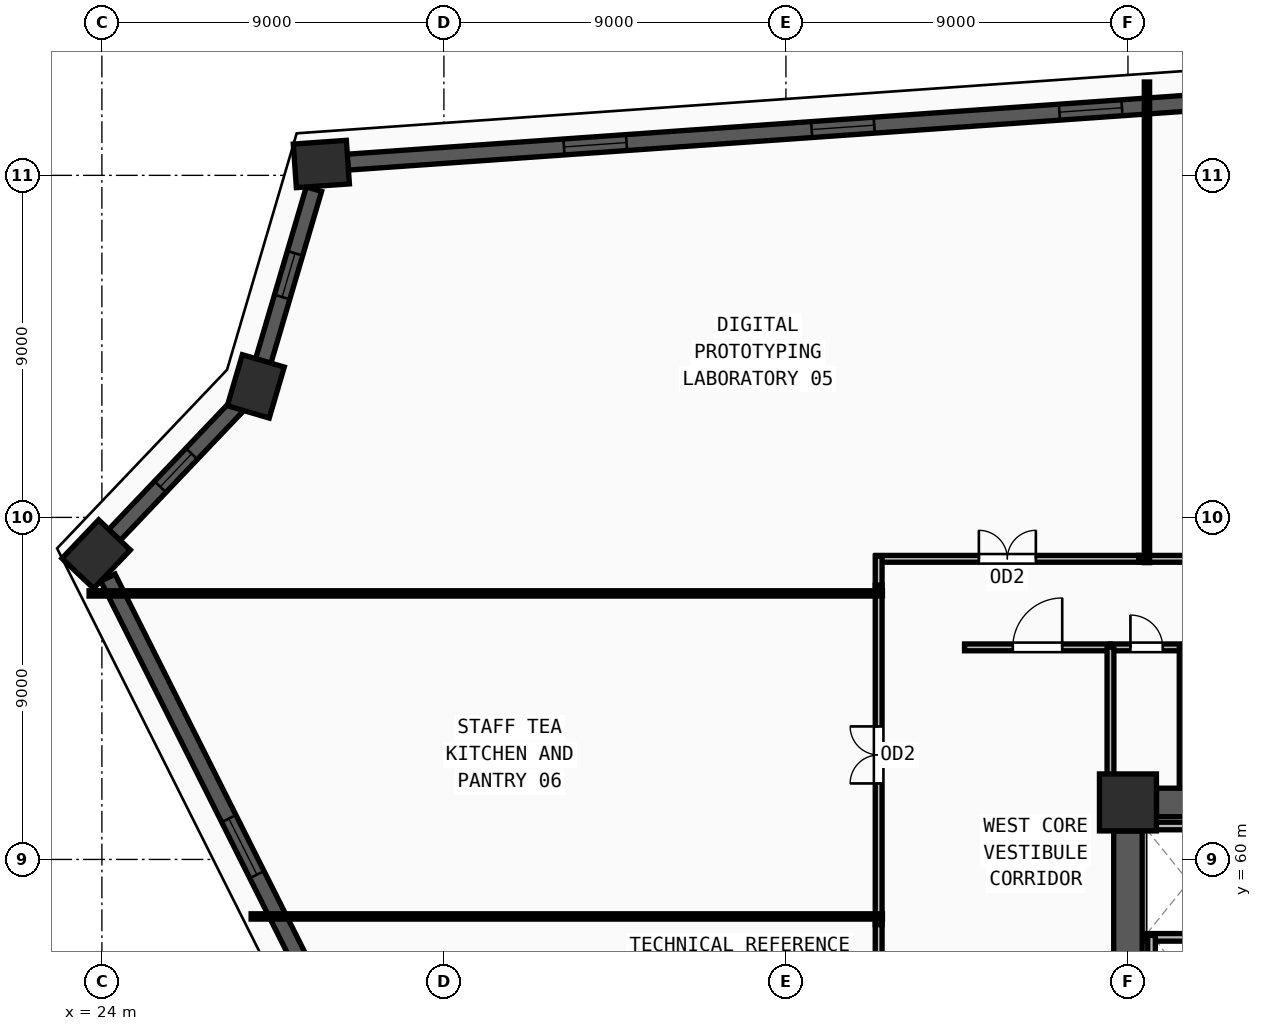
"""IFC4 building model, lengths in metres.
Left out: names, types, materials, properties, quantities, classifications, styles, units other than length and angle.
Written with IfcOpenShell. Run it as: python <this file> out.ifc"""

import sys

from ifc_helpers import new_model, si_unit, direction, frame, frame_2d, origin, origin_2d, place, context, subcontext, project, spatial, rectangle, extrude, source, transform, mapped, element, fill, save


model = new_model("IFC4")
c1 = context("Model", 3, precision=1e-05, world=origin(), true_north=direction((0.0, 1.0)))
c2 = subcontext(c1, "Body", "Model", "MODEL_VIEW")
j1 = project(units=[si_unit("LENGTHUNIT", "METRE"), si_unit("PLANEANGLEUNIT", "RADIAN")], contexts=[c1])
p1 = place(None, origin())
s1 = spatial("IfcSite", under=j1, at=p1, CompositionType="ELEMENT")
p2 = place(p1, origin())
s2 = spatial("IfcBuilding", under=s1, at=p2, CompositionType="ELEMENT")
p3 = place(p2, frame((0.0, 0.0, 124.5)))
s3 = spatial("IfcBuildingStorey", under=s2, at=p3, CompositionType="ELEMENT", Elevation=124.5)
m1 = source(origin(), c2, "Body", "SweptSolid", [
    extrude(rectangle(XDim=1.5, YDim=1.5, at=origin_2d()), origin(), (0.0, 0.0, 1.0), 3.75),
])
p4 = place(p3, frame((51.0, 61.5, 0.0), z_axis=(0.0, 0.0, 1.0), x_axis=(1.0, 0.0, 0.0)))
e1 = element("IfcColumn", 1, at=p4, inside=s3, PredefinedType="COLUMN", context=c2, shape_type="MappedRepresentation", body=[
    mapped(m1, transform((0.0, 0.0, 0.0), x_axis=(1.0, 0.0, 0.0), y_axis=(0.0, 1.0, 0.0), z_axis=(0.0, 0.0, 1.0), scale=1.0)),
])
m2 = source(origin(), c2, "Body", "SweptSolid", [
    extrude(rectangle(XDim=1.4, YDim=1.15, at=origin_2d()), origin(), (0.0, 0.0, 1.0), 3.75),
])
for number, where, z_axis, x_axis in (
    (2, (23.849, 68.032, 0.0), (0.0, 0.0, 1.0), (0.689, 0.724, 0.0)),
    (3, (28.05, 72.447, 0.0), (0.0, 0.0, 1.0), (0.283, 0.959, 0.0)),
    (4, (29.775, 78.299, 0.0), (0.0, 0.0, 1.0), (0.998, 0.07, 0.0)),
):
    element("IfcColumn", number, at=place(p3, frame(where, z_axis=z_axis, x_axis=x_axis)), inside=s3, PredefinedType="COLUMN", context=c2, shape_type="MappedRepresentation", body=[
        mapped(m2, transform((0.0, 0.0, 0.0), x_axis=(1.0, 0.0, 0.0), y_axis=(0.0, 1.0, 0.0), z_axis=(0.0, 0.0, 1.0), scale=1.0)),
    ])
p5 = place(p3, frame((56.538, 80.178, 0.0), z_axis=(0.0, 0.0, 1.0), x_axis=(-0.997543510354, -0.070049589226, 0.0)))
e5 = element("IfcWall", 5, at=p5, inside=s3, PredefinedType="SOLIDWALL", context=c2, shape_type="SweptSolid", body=[
    extrude(rectangle(XDim=26.139, YDim=0.42, at=frame_2d((13.07, 0.0))), origin(), (0.0, 0.0, 1.0), 3.57),
])
m3 = source(origin(), c2, "Body", "SweptSolid", [
    extrude(rectangle(XDim=1.65, YDim=1.95, at=frame_2d((0.825, 0.975))), frame((0.0, 0.22, 0.0), z_axis=(0.0, -1.0, 0.0), x_axis=(1.0, 0.0, 0.0)), (0.0, 0.0, 1.0), 0.44),
])
p6 = place(p5, frame((5.71, 0.0, 0.55)))
e6 = element("IfcOpeningElement", 6, at=p6, cuts=e5, PredefinedType="OPENING", context=c2, shape_type="MappedRepresentation", body=[
    mapped(m3, transform((0.0, 0.0, 0.0), x_axis=(1.0, 0.0, 0.0), y_axis=(0.0, 1.0, 0.0), z_axis=(0.0, 0.0, 1.0), scale=1.0)),
])
p7 = place(p5, frame((12.245, 0.0, 0.55)))
e7 = element("IfcOpeningElement", 7, at=p7, cuts=e5, PredefinedType="OPENING", context=c2, shape_type="MappedRepresentation", body=[
    mapped(m3, transform((0.0, 0.0, 0.0), x_axis=(1.0, 0.0, 0.0), y_axis=(0.0, 1.0, 0.0), z_axis=(0.0, 0.0, 1.0), scale=1.0)),
])
p8 = place(p5, frame((18.779, 0.0, 0.55)))
e8 = element("IfcOpeningElement", 8, at=p8, cuts=e5, PredefinedType="OPENING", context=c2, shape_type="MappedRepresentation", body=[
    mapped(m3, transform((0.0, 0.0, 0.0), x_axis=(1.0, 0.0, 0.0), y_axis=(0.0, 1.0, 0.0), z_axis=(0.0, 0.0, 1.0), scale=1.0)),
])
p9 = place(p3, frame((29.58, 77.637, 0.0), z_axis=(0.0, 0.0, 1.0), x_axis=(-0.282785049885, -0.959183306549, 0.0)))
e9 = element("IfcWall", 9, at=p9, inside=s3, PredefinedType="SOLIDWALL", context=c2, shape_type="SweptSolid", body=[
    extrude(rectangle(XDim=4.721, YDim=0.42, at=frame_2d((2.36, 0.0))), origin(), (0.0, 0.0, 1.0), 3.57),
])
m4 = source(origin(), c2, "Body", "SweptSolid", [
    extrude(rectangle(XDim=1.2, YDim=1.9, at=frame_2d((0.6, 0.95))), frame((0.0, 0.22, 0.0), z_axis=(0.0, -1.0, 0.0), x_axis=(1.0, 0.0, 0.0)), (0.0, 0.0, 1.0), 0.44),
])
p10 = place(p9, frame((1.76, 0.0, 0.55)))
e10 = element("IfcOpeningElement", 10, at=p10, cuts=e9, PredefinedType="OPENING", context=c2, shape_type="MappedRepresentation", body=[
    mapped(m4, transform((0.0, 0.0, 0.0), x_axis=(1.0, 0.0, 0.0), y_axis=(0.0, 1.0, 0.0), z_axis=(0.0, 0.0, 1.0), scale=1.0)),
])
p11 = place(p3, frame((27.574, 71.947, 0.0), z_axis=(0.0, 0.0, 1.0), x_axis=(-0.689277430431, -0.72449749751, 0.0)))
e11 = element("IfcWall", 11, at=p11, inside=s3, PredefinedType="SOLIDWALL", context=c2, shape_type="SweptSolid", body=[
    extrude(rectangle(XDim=4.714, YDim=0.42, at=frame_2d((2.357, 0.0))), origin(), (0.0, 0.0, 1.0), 3.57),
])
p12 = place(p11, frame((1.757, 0.0, 0.55)))
e12 = element("IfcOpeningElement", 12, at=p12, cuts=e11, PredefinedType="OPENING", context=c2, shape_type="MappedRepresentation", body=[
    mapped(m4, transform((0.0, 0.0, 0.0), x_axis=(1.0, 0.0, 0.0), y_axis=(0.0, 1.0, 0.0), z_axis=(0.0, 0.0, 1.0), scale=1.0)),
])
p13 = place(p3, frame((24.158, 67.415, 0.0), z_axis=(0.0, 0.0, 1.0), x_axis=(0.448489429893, -0.893788135564, 0.0)))
e13 = element("IfcWall", 13, at=p13, inside=s3, PredefinedType="SOLIDWALL", context=c2, shape_type="SweptSolid", body=[
    extrude(rectangle(XDim=31.677, YDim=0.42, at=frame_2d((15.839, 0.0))), origin(), (0.0, 0.0, 1.0), 3.57),
])
p14 = place(p13, frame((7.094, 0.0, 0.55)))
e14 = element("IfcOpeningElement", 14, at=p14, cuts=e13, PredefinedType="OPENING", context=c2, shape_type="MappedRepresentation", body=[
    mapped(m3, transform((0.0, 0.0, 0.0), x_axis=(1.0, 0.0, 0.0), y_axis=(0.0, 1.0, 0.0), z_axis=(0.0, 0.0, 1.0), scale=1.0)),
])
p15 = place(p13, frame((16.564, 0.0, 0.55)))
e15 = element("IfcOpeningElement", 15, at=p15, cuts=e13, PredefinedType="OPENING", context=c2, shape_type="MappedRepresentation", body=[
    mapped(m3, transform((0.0, 0.0, 0.0), x_axis=(1.0, 0.0, 0.0), y_axis=(0.0, 1.0, 0.0), z_axis=(0.0, 0.0, 1.0), scale=1.0)),
])
p16 = place(p13, frame((21.383, 0.0, 0.55)))
e16 = element("IfcOpeningElement", 16, at=p16, cuts=e13, PredefinedType="OPENING", context=c2, shape_type="MappedRepresentation", body=[
    mapped(m3, transform((0.0, 0.0, 0.0), x_axis=(1.0, 0.0, 0.0), y_axis=(0.0, 1.0, 0.0), z_axis=(0.0, 0.0, 1.0), scale=1.0)),
])
p17 = place(p3, frame((51.75, 61.5, 0.0), z_axis=(0.0, 0.0, 1.0), x_axis=(1.0, 0.0, 0.0)))
e17 = element("IfcWall", 17, at=p17, inside=s3, PredefinedType="SHEAR", context=c2, shape_type="SweptSolid", body=[
    extrude(rectangle(XDim=7.5, YDim=0.75, at=frame_2d((3.75, 0.0))), origin(), (0.0, 0.0, 1.0), 3.57),
])
p18 = place(p3, frame((51.0, 47.25, 0.0), z_axis=(0.0, 0.0, 1.0), x_axis=(0.0, 1.0, 0.0)))
e18 = element("IfcWall", 18, at=p18, inside=s3, PredefinedType="SHEAR", context=c2, shape_type="SweptSolid", body=[
    extrude(rectangle(XDim=13.5, YDim=0.75, at=frame_2d((6.75, 0.0))), origin(), (0.0, 0.0, 1.0), 3.57),
])
for number, where, z_axis, x_axis in (
    (19, (51.4, 57.95, 0.0), (0.0, 0.0, 1.0), (1.0, 0.0, 0.0)),
    (20, (53.8, 60.88, 0.0), (0.0, 0.0, 1.0), (-1.0, 0.0, 0.0)),
):
    element("IfcWall", number, at=place(p3, frame(where, z_axis=z_axis, x_axis=x_axis)), inside=s3, PredefinedType="SOLIDWALL", context=c2, shape_type="SweptSolid", body=[
        extrude(rectangle(XDim=2.4, YDim=0.2, at=frame_2d((1.2, 0.0))), origin(), (0.0, 0.0, 1.0), 3.57),
    ])
p19 = place(p3, frame((51.62, 58.0, 0.0), z_axis=(0.0, 0.0, 1.0), x_axis=(0.0, -1.0, 0.0)))
e21 = element("IfcWall", 21, at=p19, inside=s3, PredefinedType="SOLIDWALL", context=c2, shape_type="SweptSolid", body=[
    extrude(rectangle(XDim=3.0, YDim=0.2, at=frame_2d((1.5, 0.0))), origin(), (0.0, 0.0, 1.0), 3.57),
])
p20 = place(p3, frame((50.54, 65.58, 0.0), z_axis=(0.0, 0.0, 1.0), x_axis=(1.0, 0.0, 0.0)))
e22 = element("IfcWall", 22, at=p20, inside=s3, PredefinedType="PARTITIONING", context=c2, shape_type="SweptSolid", body=[
    extrude(rectangle(XDim=1.9, YDim=0.18, at=frame_2d((0.95, 0.0))), origin(), (0.0, 0.0, 1.0), 3.57),
])
m5 = source(origin(), c2, "Body", "SweptSolid", [
    extrude(rectangle(XDim=0.85, YDim=2.1, at=frame_2d((0.425, 1.05))), frame((0.0, 0.1, 0.0), z_axis=(0.0, -1.0, 0.0), x_axis=(1.0, 0.0, 0.0)), (0.0, 0.0, 1.0), 0.2),
])
p21 = place(p20, frame((0.525, 0.0, 0.0)))
e23 = element("IfcOpeningElement", 23, at=p21, cuts=e22, PredefinedType="OPENING", context=c2, shape_type="MappedRepresentation", body=[
    mapped(m5, transform((0.0, 0.0, 0.0), x_axis=(1.0, 0.0, 0.0), y_axis=(0.0, 1.0, 0.0), z_axis=(0.0, 0.0, 1.0), scale=1.0)),
])
p22 = place(p3, frame((46.7, 65.58, 0.0), z_axis=(0.0, 0.0, 1.0), x_axis=(1.0, 0.0, 0.0)))
e24 = element("IfcWall", 24, at=p22, inside=s3, PredefinedType="PARTITIONING", context=c2, shape_type="SweptSolid", body=[
    extrude(rectangle(XDim=3.84, YDim=0.18, at=frame_2d((1.92, 0.0))), origin(), (0.0, 0.0, 1.0), 3.57),
])
m6 = source(origin(), c2, "Body", "SweptSolid", [
    extrude(rectangle(XDim=1.3, YDim=2.2, at=frame_2d((0.65, 1.1))), frame((0.0, 0.1, 0.0), z_axis=(0.0, -1.0, 0.0), x_axis=(1.0, 0.0, 0.0)), (0.0, 0.0, 1.0), 0.2),
])
p23 = place(p22, frame((1.27, 0.0, 0.0)))
e25 = element("IfcOpeningElement", 25, at=p23, cuts=e24, PredefinedType="OPENING", context=c2, shape_type="MappedRepresentation", body=[
    mapped(m6, transform((0.0, 0.0, 0.0), x_axis=(1.0, 0.0, 0.0), y_axis=(0.0, 1.0, 0.0), z_axis=(0.0, 0.0, 1.0), scale=1.0)),
])
p24 = place(p3, frame((51.285, 67.91, 0.0), z_axis=(0.0, 0.0, 1.0), x_axis=(1.0, 0.0, 0.0)))
e26 = element("IfcWall", 26, at=p24, inside=s3, PredefinedType="PARTITIONING", context=c2, shape_type="SweptSolid", body=[
    extrude(rectangle(XDim=9.0, YDim=0.18, at=frame_2d((4.5, 0.0))), origin(), (0.0, 0.0, 1.0), 3.57),
])
m7 = source(origin(), c2, "Body", "SweptSolid", [
    extrude(rectangle(XDim=1.0, YDim=2.2, at=frame_2d((0.5, 1.1))), frame((0.0, 0.1, 0.0), z_axis=(0.0, -1.0, 0.0), x_axis=(1.0, 0.0, 0.0)), (0.0, 0.0, 1.0), 0.2),
])
p25 = place(p24, frame((4.0, 0.0, 0.0)))
e27 = element("IfcOpeningElement", 27, at=p25, cuts=e26, PredefinedType="OPENING", context=c2, shape_type="MappedRepresentation", body=[
    mapped(m7, transform((0.0, 0.0, 0.0), x_axis=(1.0, 0.0, 0.0), y_axis=(0.0, 1.0, 0.0), z_axis=(0.0, 0.0, 1.0), scale=1.0)),
])
p26 = place(p3, frame((44.37, 67.91, 0.0), z_axis=(0.0, 0.0, 1.0), x_axis=(1.0, 0.0, 0.0)))
e28 = element("IfcWall", 28, at=p26, inside=s3, PredefinedType="PARTITIONING", context=c2, shape_type="SweptSolid", body=[
    extrude(rectangle(XDim=6.915, YDim=0.18, at=frame_2d((3.458, 0.0))), origin(), (0.0, 0.0, 1.0), 3.57),
])
m8 = source(origin(), c2, "Body", "SweptSolid", [
    extrude(rectangle(XDim=1.5, YDim=2.2, at=frame_2d((0.75, 1.1))), frame((0.0, 0.1, 0.0), z_axis=(0.0, -1.0, 0.0), x_axis=(1.0, 0.0, 0.0)), (0.0, 0.0, 1.0), 0.2),
])
p27 = place(p26, frame((2.707, 0.0, 0.0)))
e29 = element("IfcOpeningElement", 29, at=p27, cuts=e28, PredefinedType="OPENING", context=c2, shape_type="MappedRepresentation", body=[
    mapped(m8, transform((0.0, 0.0, 0.0), x_axis=(1.0, 0.0, 0.0), y_axis=(0.0, 1.0, 0.0), z_axis=(0.0, 0.0, 1.0), scale=1.0)),
])
p28 = place(p3, frame((44.44, 58.285, 0.0), z_axis=(0.0, 0.0, 1.0), x_axis=(0.0, 1.0, 0.0)))
e30 = element("IfcWall", 30, at=p28, inside=s3, PredefinedType="PARTITIONING", context=c2, shape_type="SweptSolid", body=[
    extrude(rectangle(XDim=8.93, YDim=0.18, at=frame_2d((4.465, 0.0))), origin(), (0.0, 0.0, 1.0), 3.57),
])
p29 = place(p28, frame((3.715, 0.0, 0.0)))
e31 = element("IfcOpeningElement", 31, at=p29, cuts=e30, PredefinedType="OPENING", context=c2, shape_type="MappedRepresentation", body=[
    mapped(m8, transform((0.0, 0.0, 0.0), x_axis=(1.0, 0.0, 0.0), y_axis=(0.0, 1.0, 0.0), z_axis=(0.0, 0.0, 1.0), scale=1.0)),
])
p30 = place(p3, frame((50.54, 61.95, 0.0), z_axis=(0.0, 0.0, 1.0), x_axis=(0.0, 1.0, 0.0)))
e32 = element("IfcWall", 32, at=p30, inside=s3, PredefinedType="PARTITIONING", context=c2, shape_type="SweptSolid", body=[
    extrude(rectangle(XDim=3.63, YDim=0.18, at=frame_2d((1.815, 0.0))), origin(), (0.0, 0.0, 1.0), 3.57),
])
p31 = place(p3, frame((52.44, 61.875, 0.0), z_axis=(0.0, 0.0, 1.0), x_axis=(0.0, 1.0, 0.0)))
e33 = element("IfcWall", 33, at=p31, inside=s3, PredefinedType="PARTITIONING", context=c2, shape_type="SweptSolid", body=[
    extrude(rectangle(XDim=3.705, YDim=0.18, at=frame_2d((1.853, 0.0))), origin(), (0.0, 0.0, 1.0), 3.57),
])
p32 = place(p3, frame((44.44, 67.215, 0.0), z_axis=(0.0, 0.0, 1.0), x_axis=(0.0, 1.0, 0.0)))
e34 = element("IfcWall", 34, at=p32, inside=s3, PredefinedType="PARTITIONING", context=c2, shape_type="SweptSolid", body=[
    extrude(rectangle(XDim=0.765, YDim=0.18, at=frame_2d((0.382, 0.0))), origin(), (0.0, 0.0, 1.0), 3.57),
])
p33 = place(p3, frame((44.44, 56.19, 0.0), z_axis=(0.0, 0.0, 1.0), x_axis=(0.0, 1.0, 0.0)))
e35 = element("IfcWall", 35, at=p33, inside=s3, PredefinedType="PARTITIONING", context=c2, shape_type="SweptSolid", body=[
    extrude(rectangle(XDim=2.095, YDim=0.18, at=frame_2d((1.047, 0.0))), origin(), (0.0, 0.0, 1.0), 3.57),
])
p34 = place(p3, frame((44.54, 58.5, 0.0), z_axis=(0.0, 0.0, 1.0), x_axis=(-1.0, 0.0, 0.0)))
e36 = element("IfcWall", 36, at=p34, inside=s3, PredefinedType="PARTITIONING", context=c2, shape_type="SweptSolid", body=[
    extrude(rectangle(XDim=16.613, YDim=0.14, at=frame_2d((8.307, 0.0))), origin(), (0.0, 0.0, 1.0), 3.57),
])
p35 = place(p3, frame((44.54, 67.0, 0.0), z_axis=(0.0, 0.0, 1.0), x_axis=(-1.0, 0.0, 0.0)))
e37 = element("IfcWall", 37, at=p35, inside=s3, PredefinedType="PARTITIONING", context=c2, shape_type="SweptSolid", body=[
    extrude(rectangle(XDim=20.878, YDim=0.14, at=frame_2d((10.439, 0.0))), origin(), (0.0, 0.0, 1.0), 2.755),
])
p36 = place(p3, frame((51.5, 67.81, 0.0), z_axis=(0.0, 0.0, 1.0), x_axis=(0.0, 1.0, 0.0)))
e38 = element("IfcWall", 38, at=p36, inside=s3, PredefinedType="PARTITIONING", context=c2, shape_type="SweptSolid", body=[
    extrude(rectangle(XDim=12.646, YDim=0.14, at=frame_2d((6.323, 0.0))), origin(), (0.0, 0.0, 1.0), 3.57),
])
m9 = source(origin(), c2, "Body", "SweptSolid", [
    extrude(rectangle(XDim=1.65, YDim=1.95, at=frame_2d((0.825, 0.975))), frame((0.0, 0.03, 0.0), z_axis=(0.0, -1.0, 0.0), x_axis=(1.0, 0.0, 0.0)), (0.0, 0.0, 1.0), 0.06),
])
p37 = place(p6, origin())
e39 = element("IfcWindow", 39, at=p37, inside=s3, PartitioningType="DOUBLE_PANEL_VERTICAL", PredefinedType="WINDOW", context=c2, shape_type="MappedRepresentation", body=[
    mapped(m9, transform((0.0, 0.0, 0.0), x_axis=(1.0, 0.0, 0.0), y_axis=(0.0, 1.0, 0.0), z_axis=(0.0, 0.0, 1.0), scale=1.0)),
])
fill(e6, e39)
p38 = place(p7, origin())
e40 = element("IfcWindow", 40, at=p38, inside=s3, PartitioningType="DOUBLE_PANEL_VERTICAL", PredefinedType="WINDOW", context=c2, shape_type="MappedRepresentation", body=[
    mapped(m9, transform((0.0, 0.0, 0.0), x_axis=(1.0, 0.0, 0.0), y_axis=(0.0, 1.0, 0.0), z_axis=(0.0, 0.0, 1.0), scale=1.0)),
])
fill(e7, e40)
p39 = place(p8, origin())
e41 = element("IfcWindow", 41, at=p39, inside=s3, PartitioningType="DOUBLE_PANEL_VERTICAL", PredefinedType="WINDOW", context=c2, shape_type="MappedRepresentation", body=[
    mapped(m9, transform((0.0, 0.0, 0.0), x_axis=(1.0, 0.0, 0.0), y_axis=(0.0, 1.0, 0.0), z_axis=(0.0, 0.0, 1.0), scale=1.0)),
])
fill(e8, e41)
m10 = source(origin(), c2, "Body", "SweptSolid", [
    extrude(rectangle(XDim=1.2, YDim=1.9, at=frame_2d((0.6, 0.95))), frame((0.0, 0.03, 0.0), z_axis=(0.0, -1.0, 0.0), x_axis=(1.0, 0.0, 0.0)), (0.0, 0.0, 1.0), 0.06),
])
p40 = place(p10, origin())
e42 = element("IfcWindow", 42, at=p40, inside=s3, PartitioningType="SINGLE_PANEL", PredefinedType="WINDOW", context=c2, shape_type="MappedRepresentation", body=[
    mapped(m10, transform((0.0, 0.0, 0.0), x_axis=(1.0, 0.0, 0.0), y_axis=(0.0, 1.0, 0.0), z_axis=(0.0, 0.0, 1.0), scale=1.0)),
])
fill(e10, e42)
p41 = place(p12, origin())
e43 = element("IfcWindow", 43, at=p41, inside=s3, PartitioningType="SINGLE_PANEL", PredefinedType="WINDOW", context=c2, shape_type="MappedRepresentation", body=[
    mapped(m10, transform((0.0, 0.0, 0.0), x_axis=(1.0, 0.0, 0.0), y_axis=(0.0, 1.0, 0.0), z_axis=(0.0, 0.0, 1.0), scale=1.0)),
])
fill(e12, e43)
p42 = place(p14, origin())
e44 = element("IfcWindow", 44, at=p42, inside=s3, PartitioningType="DOUBLE_PANEL_VERTICAL", PredefinedType="WINDOW", context=c2, shape_type="MappedRepresentation", body=[
    mapped(m9, transform((0.0, 0.0, 0.0), x_axis=(1.0, 0.0, 0.0), y_axis=(0.0, 1.0, 0.0), z_axis=(0.0, 0.0, 1.0), scale=1.0)),
])
fill(e14, e44)
m11 = source(origin(), c2, "Body", "SweptSolid", [
    extrude(rectangle(XDim=0.85, YDim=2.1, at=frame_2d((0.425, 1.05))), frame((0.0, 0.025, 0.0), z_axis=(0.0, -1.0, 0.0), x_axis=(1.0, 0.0, 0.0)), (0.0, 0.0, 1.0), 0.05),
])
p43 = place(p21, origin())
e45 = element("IfcDoor", 45, at=p43, inside=s3, OperationType="SINGLE_SWING_LEFT", PredefinedType="DOOR", context=c2, shape_type="MappedRepresentation", body=[
    mapped(m11, transform((0.0, 0.0, 0.0), x_axis=(1.0, 0.0, 0.0), y_axis=(0.0, 1.0, 0.0), z_axis=(0.0, 0.0, 1.0), scale=1.0)),
])
fill(e23, e45)
m12 = source(origin(), c2, "Body", "SweptSolid", [
    extrude(rectangle(XDim=1.3, YDim=2.2, at=frame_2d((0.65, 1.1))), frame((0.0, 0.025, 0.0), z_axis=(0.0, -1.0, 0.0), x_axis=(1.0, 0.0, 0.0)), (0.0, 0.0, 1.0), 0.05),
])
p44 = place(p23, origin())
e46 = element("IfcDoor", 46, at=p44, inside=s3, OperationType="SINGLE_SWING_RIGHT", PredefinedType="DOOR", context=c2, shape_type="MappedRepresentation", body=[
    mapped(m12, transform((0.0, 0.0, 0.0), x_axis=(1.0, 0.0, 0.0), y_axis=(0.0, 1.0, 0.0), z_axis=(0.0, 0.0, 1.0), scale=1.0)),
])
fill(e25, e46)
m13 = source(origin(), c2, "Body", "SweptSolid", [
    extrude(rectangle(XDim=1.5, YDim=2.2, at=frame_2d((0.75, 1.1))), frame((0.0, 0.025, 0.0), z_axis=(0.0, -1.0, 0.0), x_axis=(1.0, 0.0, 0.0)), (0.0, 0.0, 1.0), 0.05),
])
p45 = place(p27, origin())
e47 = element("IfcDoor", 47, at=p45, inside=s3, OperationType="DOUBLE_DOOR_SINGLE_SWING", PredefinedType="DOOR", context=c2, shape_type="MappedRepresentation", body=[
    mapped(m13, transform((0.0, 0.0, 0.0), x_axis=(1.0, 0.0, 0.0), y_axis=(0.0, 1.0, 0.0), z_axis=(0.0, 0.0, 1.0), scale=1.0)),
])
fill(e29, e47)
p46 = place(p29, origin())
e48 = element("IfcDoor", 48, at=p46, inside=s3, OperationType="DOUBLE_DOOR_SINGLE_SWING", PredefinedType="DOOR", context=c2, shape_type="MappedRepresentation", body=[
    mapped(m13, transform((0.0, 0.0, 0.0), x_axis=(1.0, 0.0, 0.0), y_axis=(0.0, 1.0, 0.0), z_axis=(0.0, 0.0, 1.0), scale=1.0)),
])
fill(e31, e48)
save(model, sys.argv[1])
